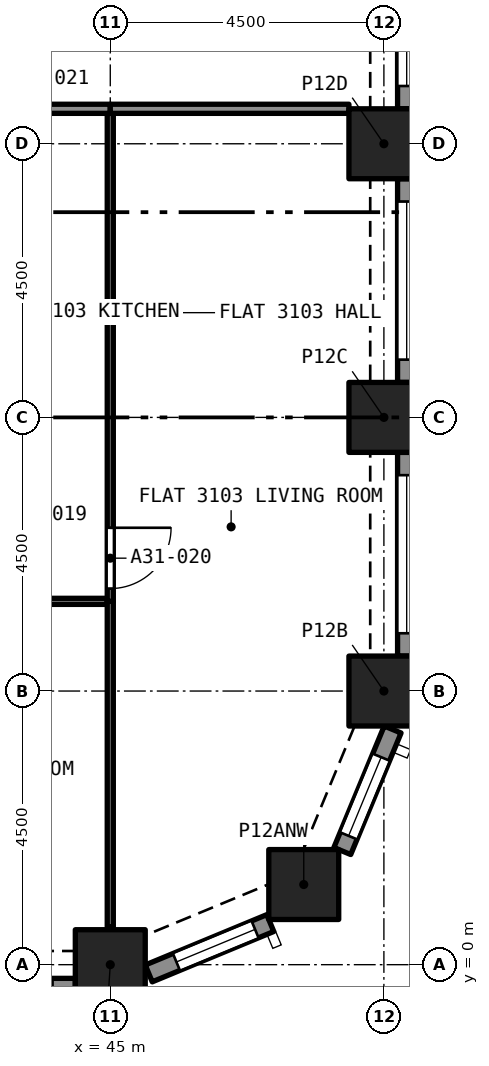
"""IFC4 building model, lengths in metres.
Left out: names, types, materials, properties, quantities, classifications, styles, units other than length and angle.
Written with IfcOpenShell. Run it as: python <this file> out.ifc"""

import sys

from ifc_helpers import new_model, si_unit, direction, frame, frame_2d, origin, origin_2d, place, context, subcontext, project, spatial, rectangle, extrude, element, fill, save


model = new_model("IFC4")
c1 = context("Model", 3, precision=1e-05, world=origin(), true_north=direction((0.0, 1.0)))
c2 = subcontext(c1, "Body", "Model", "MODEL_VIEW")
j1 = project(units=[si_unit("LENGTHUNIT", "METRE"), si_unit("PLANEANGLEUNIT", "RADIAN")], contexts=[c1])
p1 = place(None, origin())
s1 = spatial("IfcSite", under=j1, at=p1, CompositionType="ELEMENT")
p2 = place(p1, origin())
s2 = spatial("IfcBuilding", under=s1, at=p2, CompositionType="ELEMENT")
p3 = place(p2, frame((0.0, 0.0, 112.0)))
s3 = spatial("IfcBuildingStorey", under=s2, at=p3, CompositionType="ELEMENT", Elevation=112.0)
for number, where, z_axis, x_axis in (
    (1, (45.0, 0.0, 0.0), (0.0, 0.0, 1.0), (1.0, 0.0, 0.0)),
    (2, (48.182, 1.318, 0.0), (0.0, 0.0, 1.0), (1.0, 0.0, 0.0)),
    (3, (49.5, 4.5, 0.0), (0.0, 0.0, 1.0), (1.0, 0.0, 0.0)),
    (4, (49.5, 9.0, 0.0), (0.0, 0.0, 1.0), (1.0, 0.0, 0.0)),
    (5, (49.5, 13.5, 0.0), (0.0, 0.0, 1.0), (1.0, 0.0, 0.0)),
):
    element("IfcColumn", number, at=place(p3, frame(where, z_axis=z_axis, x_axis=x_axis)), inside=s3, PredefinedType="COLUMN", context=c2, shape_type="SweptSolid", body=[
        extrude(rectangle(XDim=1.15, YDim=1.15, at=origin_2d()), origin(), (0.0, 0.0, 1.0), 3.2),
    ])
p4 = place(p3, frame((44.425, -0.375, 0.0), z_axis=(0.0, 0.0, 1.0), x_axis=(-1.0, 0.0, 0.0)))
e6 = element("IfcWall", 6, at=p4, inside=s3, PredefinedType="SOLIDWALL", context=c2, shape_type="SweptSolid", body=[
    extrude(rectangle(XDim=3.35, YDim=0.3, at=frame_2d((1.675, 0.0))), origin(), (0.0, 0.0, 1.0), 3.2),
])
p5 = place(p4, frame((0.375, 0.0, 0.45)))
e7 = element("IfcOpeningElement", 7, at=p5, cuts=e6, PredefinedType="OPENING", context=c2, shape_type="SweptSolid", body=[
    extrude(rectangle(XDim=2.6, YDim=1.95, at=frame_2d((1.3, 0.975))), frame((0.0, 0.16, 0.0), z_axis=(0.0, -1.0, 0.0), x_axis=(1.0, 0.0, 0.0)), (0.0, 0.0, 1.0), 0.32),
])
p6 = place(p3, frame((47.631, 0.684, 0.0), z_axis=(0.0, 0.0, 1.0), x_axis=(-0.923862802911, -0.382723818695, 0.0)))
e8 = element("IfcWall", 8, at=p6, inside=s3, PredefinedType="SOLIDWALL", context=c2, shape_type="SweptSolid", body=[
    extrude(rectangle(XDim=2.164, YDim=0.3, at=frame_2d((1.082, 0.0))), origin(), (0.0, 0.0, 1.0), 3.2),
])
p7 = place(p6, frame((0.271, 0.0, 0.45)))
e9 = element("IfcOpeningElement", 9, at=p7, cuts=e8, PredefinedType="OPENING", context=c2, shape_type="SweptSolid", body=[
    extrude(rectangle(XDim=1.4, YDim=1.95, at=frame_2d((0.7, 0.975))), frame((0.0, 0.16, 0.0), z_axis=(0.0, -1.0, 0.0), x_axis=(1.0, 0.0, 0.0)), (0.0, 0.0, 1.0), 0.32),
])
p8 = place(p3, frame((49.644, 3.868, 0.0), z_axis=(0.0, 0.0, 1.0), x_axis=(-0.382723818695, -0.923862802911, 0.0)))
e10 = element("IfcWall", 10, at=p8, inside=s3, PredefinedType="SOLIDWALL", context=c2, shape_type="SweptSolid", body=[
    extrude(rectangle(XDim=2.164, YDim=0.3, at=frame_2d((1.082, 0.0))), origin(), (0.0, 0.0, 1.0), 3.2),
])
p9 = place(p8, frame((0.493, 0.0, 0.45)))
e11 = element("IfcOpeningElement", 11, at=p9, cuts=e10, PredefinedType="OPENING", context=c2, shape_type="SweptSolid", body=[
    extrude(rectangle(XDim=1.4, YDim=1.95, at=frame_2d((0.7, 0.975))), frame((0.0, 0.16, 0.0), z_axis=(0.0, -1.0, 0.0), x_axis=(1.0, 0.0, 0.0)), (0.0, 0.0, 1.0), 0.32),
])
p10 = place(p3, frame((49.875, 8.425, 0.0), z_axis=(0.0, 0.0, 1.0), x_axis=(0.0, -1.0, 0.0)))
e12 = element("IfcWall", 12, at=p10, inside=s3, PredefinedType="SOLIDWALL", context=c2, shape_type="SweptSolid", body=[
    extrude(rectangle(XDim=3.35, YDim=0.3, at=frame_2d((1.675, 0.0))), origin(), (0.0, 0.0, 1.0), 3.2),
])
p11 = place(p10, frame((0.375, 0.0, 0.45)))
e13 = element("IfcOpeningElement", 13, at=p11, cuts=e12, PredefinedType="OPENING", context=c2, shape_type="SweptSolid", body=[
    extrude(rectangle(XDim=2.6, YDim=1.95, at=frame_2d((1.3, 0.975))), frame((0.0, 0.16, 0.0), z_axis=(0.0, -1.0, 0.0), x_axis=(1.0, 0.0, 0.0)), (0.0, 0.0, 1.0), 0.32),
])
p12 = place(p3, frame((49.875, 12.925, 0.0), z_axis=(0.0, 0.0, 1.0), x_axis=(0.0, -1.0, 0.0)))
e14 = element("IfcWall", 14, at=p12, inside=s3, PredefinedType="SOLIDWALL", context=c2, shape_type="SweptSolid", body=[
    extrude(rectangle(XDim=3.35, YDim=0.3, at=frame_2d((1.675, 0.0))), origin(), (0.0, 0.0, 1.0), 3.2),
])
p13 = place(p12, frame((0.375, 0.0, 0.45)))
e15 = element("IfcOpeningElement", 15, at=p13, cuts=e14, PredefinedType="OPENING", context=c2, shape_type="SweptSolid", body=[
    extrude(rectangle(XDim=2.6, YDim=1.95, at=frame_2d((1.3, 0.975))), frame((0.0, 0.16, 0.0), z_axis=(0.0, -1.0, 0.0), x_axis=(1.0, 0.0, 0.0)), (0.0, 0.0, 1.0), 0.32),
])
p14 = place(p3, frame((49.875, 17.425, 0.0), z_axis=(0.0, 0.0, 1.0), x_axis=(0.0, -1.0, 0.0)))
e16 = element("IfcWall", 16, at=p14, inside=s3, PredefinedType="SOLIDWALL", context=c2, shape_type="SweptSolid", body=[
    extrude(rectangle(XDim=3.35, YDim=0.3, at=frame_2d((1.675, 0.0))), origin(), (0.0, 0.0, 1.0), 3.2),
])
p15 = place(p14, frame((0.375, 0.0, 0.45)))
e17 = element("IfcOpeningElement", 17, at=p15, cuts=e16, PredefinedType="OPENING", context=c2, shape_type="SweptSolid", body=[
    extrude(rectangle(XDim=2.6, YDim=1.95, at=frame_2d((1.3, 0.975))), frame((0.0, 0.16, 0.0), z_axis=(0.0, -1.0, 0.0), x_axis=(1.0, 0.0, 0.0)), (0.0, 0.0, 1.0), 0.32),
])
p16 = place(p3, frame((44.95, 5.975, 0.0), z_axis=(0.0, 0.0, 1.0), x_axis=(-1.0, 0.0, 0.0)))
e18 = element("IfcWall", 18, at=p16, inside=s3, PredefinedType="PARTITIONING", context=c2, shape_type="SweptSolid", body=[
    extrude(rectangle(XDim=4.35, YDim=0.1, at=frame_2d((2.175, 0.0))), origin(), (0.0, 0.0, 1.0), 2.9),
])
p17 = place(p16, frame((1.75, 0.0, 0.0)))
e19 = element("IfcOpeningElement", 19, at=p17, cuts=e18, PredefinedType="OPENING", context=c2, shape_type="SweptSolid", body=[
    extrude(rectangle(XDim=0.9, YDim=2.1, at=frame_2d((0.45, 1.05))), frame((0.0, 0.06, 0.0), z_axis=(0.0, -1.0, 0.0), x_axis=(1.0, 0.0, 0.0)), (0.0, 0.0, 1.0), 0.12),
])
p18 = place(p3, frame((45.0, 0.622, 0.0), z_axis=(0.0, 0.0, 1.0), x_axis=(0.0, 1.0, 0.0)))
e20 = element("IfcWall", 20, at=p18, inside=s3, PredefinedType="PARTITIONING", context=c2, shape_type="SweptSolid", body=[
    extrude(rectangle(XDim=5.353, YDim=0.1, at=frame_2d((2.676, 0.0))), origin(), (0.0, 0.0, 1.0), 2.9),
])
p19 = place(p3, frame((45.0, 14.0, 0.0), z_axis=(0.0, 0.0, 1.0), x_axis=(0.0, -1.0, 0.0)))
e21 = element("IfcWall", 21, at=p19, inside=s3, PredefinedType="PARTITIONING", context=c2, shape_type="SweptSolid", body=[
    extrude(rectangle(XDim=8.025, YDim=0.1, at=frame_2d((4.012, 0.0))), origin(), (0.0, 0.0, 1.0), 2.9),
])
p20 = place(p19, frame((6.815, 0.0, 0.0)))
e22 = element("IfcOpeningElement", 22, at=p20, cuts=e21, PredefinedType="OPENING", context=c2, shape_type="SweptSolid", body=[
    extrude(rectangle(XDim=1.0, YDim=2.1, at=frame_2d((0.5, 1.05))), frame((0.0, 0.06, 0.0), z_axis=(0.0, -1.0, 0.0), x_axis=(1.0, 0.0, 0.0)), (0.0, 0.0, 1.0), 0.12),
])
p21 = place(p3, frame((45.0, 14.075, 0.0), z_axis=(0.0, 0.0, 1.0), x_axis=(-1.0, 0.0, 0.0)))
e23 = element("IfcWall", 23, at=p21, inside=s3, PredefinedType="PARTITIONING", context=c2, shape_type="SweptSolid", body=[
    extrude(rectangle(XDim=2.25, YDim=0.15, at=frame_2d((1.125, 0.0))), origin(), (0.0, 0.0, 1.0), 2.9),
])
p22 = place(p21, frame((1.0, 0.0, 0.0)))
e24 = element("IfcOpeningElement", 24, at=p22, cuts=e23, PredefinedType="OPENING", context=c2, shape_type="SweptSolid", body=[
    extrude(rectangle(XDim=1.0, YDim=2.1, at=frame_2d((0.5, 1.05))), frame((0.0, 0.085, 0.0), z_axis=(0.0, -1.0, 0.0), x_axis=(1.0, 0.0, 0.0)), (0.0, 0.0, 1.0), 0.17),
])
p23 = place(p3, frame((45.0, 14.075, 0.0), z_axis=(0.0, 0.0, 1.0), x_axis=(1.0, 0.0, 0.0)))
e25 = element("IfcWall", 25, at=p23, inside=s3, PredefinedType="PARTITIONING", context=c2, shape_type="SweptSolid", body=[
    extrude(rectangle(XDim=3.925, YDim=0.15, at=frame_2d((1.962, 0.0))), origin(), (0.0, 0.0, 1.0), 2.9),
])
p24 = place(p7, origin())
e26 = element("IfcWindow", 26, at=p24, inside=s3, PartitioningType="SINGLE_PANEL", PredefinedType="WINDOW", context=c2, shape_type="SweptSolid", body=[
    extrude(rectangle(XDim=1.4, YDim=1.95, at=frame_2d((0.7, 0.975))), frame((0.0, 0.03, 0.0), z_axis=(0.0, -1.0, 0.0), x_axis=(1.0, 0.0, 0.0)), (0.0, 0.0, 1.0), 0.06),
])
fill(e9, e26)
p25 = place(p9, origin())
e27 = element("IfcWindow", 27, at=p25, inside=s3, PartitioningType="SINGLE_PANEL", PredefinedType="WINDOW", context=c2, shape_type="SweptSolid", body=[
    extrude(rectangle(XDim=1.4, YDim=1.95, at=frame_2d((0.7, 0.975))), frame((0.0, 0.03, 0.0), z_axis=(0.0, -1.0, 0.0), x_axis=(1.0, 0.0, 0.0)), (0.0, 0.0, 1.0), 0.06),
])
fill(e11, e27)
p26 = place(p11, origin())
e28 = element("IfcWindow", 28, at=p26, inside=s3, PartitioningType="SINGLE_PANEL", PredefinedType="WINDOW", context=c2, shape_type="SweptSolid", body=[
    extrude(rectangle(XDim=2.6, YDim=1.95, at=frame_2d((1.3, 0.975))), frame((0.0, 0.03, 0.0), z_axis=(0.0, -1.0, 0.0), x_axis=(1.0, 0.0, 0.0)), (0.0, 0.0, 1.0), 0.06),
])
fill(e13, e28)
p27 = place(p13, origin())
e29 = element("IfcWindow", 29, at=p27, inside=s3, PartitioningType="SINGLE_PANEL", PredefinedType="WINDOW", context=c2, shape_type="SweptSolid", body=[
    extrude(rectangle(XDim=2.6, YDim=1.95, at=frame_2d((1.3, 0.975))), frame((0.0, 0.03, 0.0), z_axis=(0.0, -1.0, 0.0), x_axis=(1.0, 0.0, 0.0)), (0.0, 0.0, 1.0), 0.06),
])
fill(e15, e29)
p28 = place(p15, origin())
e30 = element("IfcWindow", 30, at=p28, inside=s3, PartitioningType="SINGLE_PANEL", PredefinedType="WINDOW", context=c2, shape_type="SweptSolid", body=[
    extrude(rectangle(XDim=2.6, YDim=1.95, at=frame_2d((1.3, 0.975))), frame((0.0, 0.03, 0.0), z_axis=(0.0, -1.0, 0.0), x_axis=(1.0, 0.0, 0.0)), (0.0, 0.0, 1.0), 0.06),
])
fill(e17, e30)
p29 = place(p20, origin())
e31 = element("IfcDoor", 31, at=p29, inside=s3, OperationType="SINGLE_SWING_RIGHT", PredefinedType="DOOR", context=c2, shape_type="SweptSolid", body=[
    extrude(rectangle(XDim=1.0, YDim=2.1, at=frame_2d((0.5, 1.05))), frame((0.0, 0.025, 0.0), z_axis=(0.0, -1.0, 0.0), x_axis=(1.0, 0.0, 0.0)), (0.0, 0.0, 1.0), 0.05),
])
fill(e22, e31)
save(model, sys.argv[1])
